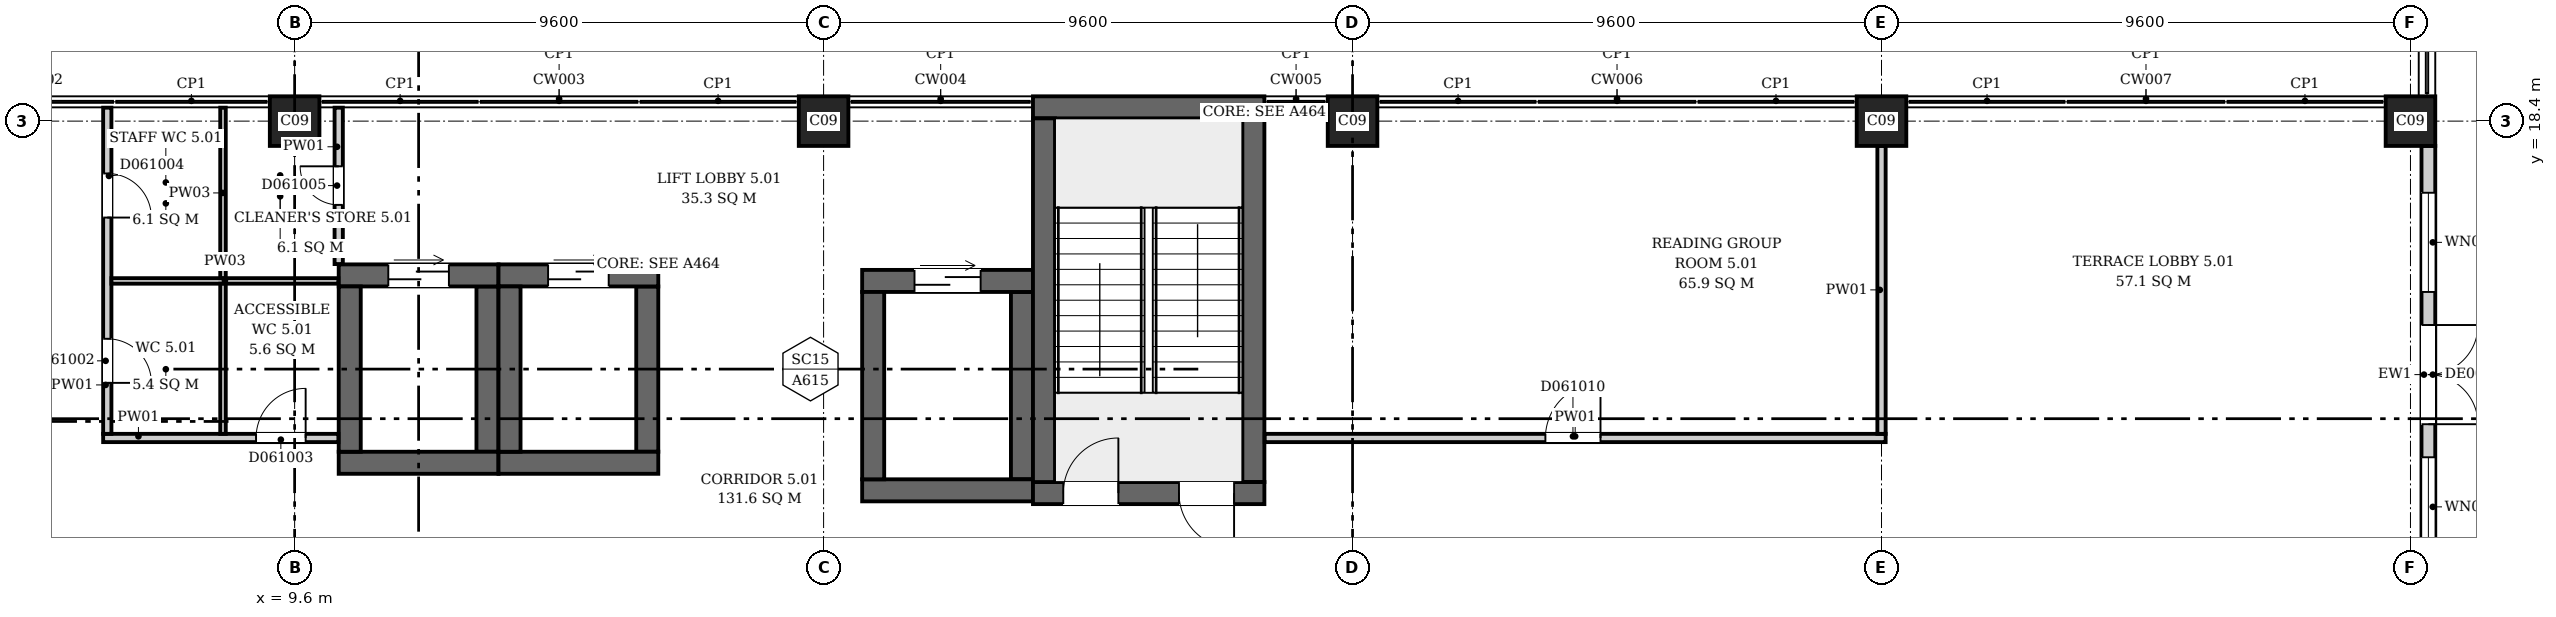
"""IFC4 building model, lengths in metres.
Left out: names, types, materials, properties, quantities, classifications, styles, units other than length and angle.
Written with IfcOpenShell. Run it as: python <this file> out.ifc"""

import sys

from ifc_helpers import new_model, si_unit, direction, frame, frame_2d, origin, origin_2d, place, context, subcontext, project, spatial, rectangle, extrude, element, fill, save


model = new_model("IFC4")
c1 = context("Model", 3, precision=1e-05, world=origin(), true_north=direction((0.0, 1.0)))
c2 = subcontext(c1, "Body", "Model", "MODEL_VIEW")
j1 = project(units=[si_unit("LENGTHUNIT", "METRE"), si_unit("PLANEANGLEUNIT", "RADIAN")], contexts=[c1])
p1 = place(None, origin())
s1 = spatial("IfcSite", under=j1, at=p1, CompositionType="ELEMENT")
p2 = place(p1, origin())
s2 = spatial("IfcBuilding", under=s1, at=p2, CompositionType="ELEMENT")
p3 = place(p2, frame((0.0, 0.0, 31.9)))
s3 = spatial("IfcBuildingStorey", under=s2, at=p3, CompositionType="ELEMENT", Elevation=31.9)
p4 = place(p3, frame((23.0, 11.65, 0.0), z_axis=(0.0, 0.0, 1.0), x_axis=(1.0, 0.0, 0.0)))
e1 = element("IfcWall", 1, at=p4, inside=s3, PredefinedType="SHEAR", context=c2, shape_type="SweptSolid", body=[
    extrude(rectangle(XDim=4.2, YDim=0.4, at=frame_2d((2.1, 0.0))), origin(), (0.0, 0.0, 1.0), 4.2),
])
p5 = place(p4, frame((0.55, 0.0, 0.0)))
e2 = element("IfcOpeningElement", 2, at=p5, cuts=e1, PredefinedType="OPENING", context=c2, shape_type="SweptSolid", body=[
    extrude(rectangle(XDim=1.0, YDim=2.1, at=frame_2d((0.5, 1.05))), frame((0.0, 0.21, 0.0), z_axis=(0.0, -1.0, 0.0), x_axis=(1.0, 0.0, 0.0)), (0.0, 0.0, 1.0), 0.42),
])
p6 = place(p4, frame((2.65, 0.0, 0.0)))
e3 = element("IfcOpeningElement", 3, at=p6, cuts=e1, PredefinedType="OPENING", context=c2, shape_type="SweptSolid", body=[
    extrude(rectangle(XDim=1.0, YDim=2.1, at=frame_2d((0.5, 1.05))), frame((0.0, 0.21, 0.0), z_axis=(0.0, -1.0, 0.0), x_axis=(1.0, 0.0, 0.0)), (0.0, 0.0, 1.0), 0.42),
])
p7 = place(p3, frame((23.0, 18.65, 0.0), z_axis=(0.0, 0.0, 1.0), x_axis=(1.0, 0.0, 0.0)))
e4 = element("IfcWall", 4, at=p7, inside=s3, PredefinedType="SHEAR", context=c2, shape_type="SweptSolid", body=[
    extrude(rectangle(XDim=4.2, YDim=0.4, at=frame_2d((2.1, 0.0))), origin(), (0.0, 0.0, 1.0), 4.2),
])
for number, where, z_axis, x_axis in (
    (5, (23.2, 11.85, 0.0), (0.0, 0.0, 1.0), (0.0, 1.0, 0.0)),
    (6, (27.0, 11.85, 0.0), (0.0, 0.0, 1.0), (0.0, 1.0, 0.0)),
):
    element("IfcWall", number, at=place(p3, frame(where, z_axis=z_axis, x_axis=x_axis)), inside=s3, PredefinedType="SHEAR", context=c2, shape_type="SweptSolid", body=[
        extrude(rectangle(XDim=6.6, YDim=0.4, at=frame_2d((3.3, 0.0))), origin(), (0.0, 0.0, 1.0), 4.2),
    ])
p8 = place(p3, frame((10.4, 12.2, 0.0), z_axis=(0.0, 0.0, 1.0), x_axis=(1.0, 0.0, 0.0)))
e7 = element("IfcWall", 7, at=p8, inside=s3, PredefinedType="SHEAR", context=c2, shape_type="SweptSolid", body=[
    extrude(rectangle(XDim=2.9, YDim=0.4, at=frame_2d((1.45, 0.0))), origin(), (0.0, 0.0, 1.0), 4.2),
])
p9 = place(p3, frame((10.4, 15.6, 0.0), z_axis=(0.0, 0.0, 1.0), x_axis=(1.0, 0.0, 0.0)))
e8 = element("IfcWall", 8, at=p9, inside=s3, PredefinedType="SHEAR", context=c2, shape_type="SweptSolid", body=[
    extrude(rectangle(XDim=2.9, YDim=0.4, at=frame_2d((1.45, 0.0))), origin(), (0.0, 0.0, 1.0), 4.2),
])
p10 = place(p9, frame((0.9, 0.0, 0.0)))
e9 = element("IfcOpeningElement", 9, at=p10, cuts=e8, PredefinedType="OPENING", context=c2, shape_type="SweptSolid", body=[
    extrude(rectangle(XDim=1.1, YDim=2.1, at=frame_2d((0.55, 1.05))), frame((0.0, 0.21, 0.0), z_axis=(0.0, -1.0, 0.0), x_axis=(1.0, 0.0, 0.0)), (0.0, 0.0, 1.0), 0.42),
])
for number, where, z_axis, x_axis in (
    (10, (10.6, 12.4, 0.0), (0.0, 0.0, 1.0), (0.0, 1.0, 0.0)),
    (11, (13.1, 12.4, 0.0), (0.0, 0.0, 1.0), (0.0, 1.0, 0.0)),
):
    element("IfcWall", number, at=place(p3, frame(where, z_axis=z_axis, x_axis=x_axis)), inside=s3, PredefinedType="SHEAR", context=c2, shape_type="SweptSolid", body=[
        extrude(rectangle(XDim=3.0, YDim=0.4, at=frame_2d((1.5, 0.0))), origin(), (0.0, 0.0, 1.0), 4.2),
    ])
p11 = place(p3, frame((13.3, 12.2, 0.0), z_axis=(0.0, 0.0, 1.0), x_axis=(1.0, 0.0, 0.0)))
e12 = element("IfcWall", 12, at=p11, inside=s3, PredefinedType="SHEAR", context=c2, shape_type="SweptSolid", body=[
    extrude(rectangle(XDim=2.9, YDim=0.4, at=frame_2d((1.45, 0.0))), origin(), (0.0, 0.0, 1.0), 4.2),
])
p12 = place(p3, frame((13.3, 15.6, 0.0), z_axis=(0.0, 0.0, 1.0), x_axis=(1.0, 0.0, 0.0)))
e13 = element("IfcWall", 13, at=p12, inside=s3, PredefinedType="SHEAR", context=c2, shape_type="SweptSolid", body=[
    extrude(rectangle(XDim=2.9, YDim=0.4, at=frame_2d((1.45, 0.0))), origin(), (0.0, 0.0, 1.0), 4.2),
])
p13 = place(p12, frame((0.9, 0.0, 0.0)))
e14 = element("IfcOpeningElement", 14, at=p13, cuts=e13, PredefinedType="OPENING", context=c2, shape_type="SweptSolid", body=[
    extrude(rectangle(XDim=1.1, YDim=2.1, at=frame_2d((0.55, 1.05))), frame((0.0, 0.21, 0.0), z_axis=(0.0, -1.0, 0.0), x_axis=(1.0, 0.0, 0.0)), (0.0, 0.0, 1.0), 0.42),
])
for number, where, z_axis, x_axis in (
    (15, (13.5, 12.4, 0.0), (0.0, 0.0, 1.0), (0.0, 1.0, 0.0)),
    (16, (16.0, 12.4, 0.0), (0.0, 0.0, 1.0), (0.0, 1.0, 0.0)),
):
    element("IfcWall", number, at=place(p3, frame(where, z_axis=z_axis, x_axis=x_axis)), inside=s3, PredefinedType="SHEAR", context=c2, shape_type="SweptSolid", body=[
        extrude(rectangle(XDim=3.0, YDim=0.4, at=frame_2d((1.5, 0.0))), origin(), (0.0, 0.0, 1.0), 4.2),
    ])
p14 = place(p3, frame((19.9, 11.7, 0.0), z_axis=(0.0, 0.0, 1.0), x_axis=(1.0, 0.0, 0.0)))
e17 = element("IfcWall", 17, at=p14, inside=s3, PredefinedType="SHEAR", context=c2, shape_type="SweptSolid", body=[
    extrude(rectangle(XDim=3.1, YDim=0.4, at=frame_2d((1.55, 0.0))), origin(), (0.0, 0.0, 1.0), 4.2),
])
p15 = place(p3, frame((19.9, 15.5, 0.0), z_axis=(0.0, 0.0, 1.0), x_axis=(1.0, 0.0, 0.0)))
e18 = element("IfcWall", 18, at=p15, inside=s3, PredefinedType="SHEAR", context=c2, shape_type="SweptSolid", body=[
    extrude(rectangle(XDim=3.1, YDim=0.4, at=frame_2d((1.55, 0.0))), origin(), (0.0, 0.0, 1.0), 4.2),
])
p16 = place(p15, frame((0.95, 0.0, 0.0)))
e19 = element("IfcOpeningElement", 19, at=p16, cuts=e18, PredefinedType="OPENING", context=c2, shape_type="SweptSolid", body=[
    extrude(rectangle(XDim=1.2, YDim=2.1, at=frame_2d((0.6, 1.05))), frame((0.0, 0.21, 0.0), z_axis=(0.0, -1.0, 0.0), x_axis=(1.0, 0.0, 0.0)), (0.0, 0.0, 1.0), 0.42),
])
for number, where, z_axis, x_axis in (
    (20, (20.1, 11.9, 0.0), (0.0, 0.0, 1.0), (0.0, 1.0, 0.0)),
    (21, (22.8, 11.9, 0.0), (0.0, 0.0, 1.0), (0.0, 1.0, 0.0)),
):
    element("IfcWall", number, at=place(p3, frame(where, z_axis=z_axis, x_axis=x_axis)), inside=s3, PredefinedType="SHEAR", context=c2, shape_type="SweptSolid", body=[
        extrude(rectangle(XDim=3.4, YDim=0.4, at=frame_2d((1.7, 0.0))), origin(), (0.0, 0.0, 1.0), 4.2),
    ])
for number, where, z_axis, x_axis in (
    (22, (9.6, 18.4, 0.0), (0.0, 0.0, 1.0), (1.0, 0.0, 0.0)),
    (23, (19.2, 18.4, 0.0), (0.0, 0.0, 1.0), (1.0, 0.0, 0.0)),
    (24, (28.8, 18.4, 0.0), (0.0, 0.0, 1.0), (1.0, 0.0, 0.0)),
    (25, (38.4, 18.4, 0.0), (0.0, 0.0, 1.0), (1.0, 0.0, 0.0)),
    (26, (48.0, 18.4, 0.0), (0.0, 0.0, 1.0), (1.0, 0.0, 0.0)),
):
    element("IfcColumn", number, at=place(p3, frame(where, z_axis=z_axis, x_axis=x_axis)), inside=s3, PredefinedType="COLUMN", context=c2, shape_type="SweptSolid", body=[
        extrude(rectangle(XDim=0.9, YDim=0.9, at=origin_2d()), origin(), (0.0, 0.0, 1.0), 4.2),
    ])
p17 = place(p3, frame((48.325, 9.65, 0.0), z_axis=(0.0, 0.0, 1.0), x_axis=(0.0, 1.0, 0.0)))
e27 = element("IfcWall", 27, at=p17, inside=s3, PredefinedType="ELEMENTEDWALL", context=c2, shape_type="SweptSolid", body=[
    extrude(rectangle(XDim=8.3, YDim=0.25, at=frame_2d((4.15, 0.0))), origin(), (0.0, 0.0, 1.0), 3.9),
])
p18 = place(p17, frame((3.25, 0.0, 0.0)))
e28 = element("IfcOpeningElement", 28, at=p18, cuts=e27, PredefinedType="OPENING", context=c2, shape_type="SweptSolid", body=[
    extrude(rectangle(XDim=1.8, YDim=2.4, at=frame_2d((0.9, 1.2))), frame((0.0, 0.135, 0.0), z_axis=(0.0, -1.0, 0.0), x_axis=(1.0, 0.0, 0.0)), (0.0, 0.0, 1.0), 0.27),
])
p19 = place(p17, frame((0.85, 0.0, 0.9)))
e29 = element("IfcOpeningElement", 29, at=p19, cuts=e27, PredefinedType="OPENING", context=c2, shape_type="SweptSolid", body=[
    extrude(rectangle(XDim=1.8, YDim=2.6, at=frame_2d((0.9, 1.3))), frame((0.0, 0.135, 0.0), z_axis=(0.0, -1.0, 0.0), x_axis=(1.0, 0.0, 0.0)), (0.0, 0.0, 1.0), 0.27),
])
p20 = place(p17, frame((5.65, 0.0, 0.9)))
e30 = element("IfcOpeningElement", 30, at=p20, cuts=e27, PredefinedType="OPENING", context=c2, shape_type="SweptSolid", body=[
    extrude(rectangle(XDim=1.8, YDim=2.6, at=frame_2d((0.9, 1.3))), frame((0.0, 0.135, 0.0), z_axis=(0.0, -1.0, 0.0), x_axis=(1.0, 0.0, 0.0)), (0.0, 0.0, 1.0), 0.27),
])
p21 = place(p3, frame((6.125, 12.65, 0.0), z_axis=(0.0, 0.0, 1.0), x_axis=(1.0, 0.0, 0.0)))
e31 = element("IfcWall", 31, at=p21, inside=s3, PredefinedType="PARTITIONING", context=c2, shape_type="SweptSolid", body=[
    extrude(rectangle(XDim=4.269, YDim=0.15, at=frame_2d((2.135, 0.0))), origin(), (0.0, 0.0, 1.0), 3.9),
])
p22 = place(p21, frame((2.775, 0.0, 0.0)))
e32 = element("IfcOpeningElement", 32, at=p22, cuts=e31, PredefinedType="OPENING", context=c2, shape_type="SweptSolid", body=[
    extrude(rectangle(XDim=0.9, YDim=2.1, at=frame_2d((0.45, 1.05))), frame((0.0, 0.085, 0.0), z_axis=(0.0, -1.0, 0.0), x_axis=(1.0, 0.0, 0.0)), (0.0, 0.0, 1.0), 0.17),
])
p23 = place(p3, frame((6.2, 12.725, 0.0), z_axis=(0.0, 0.0, 1.0), x_axis=(0.0, 1.0, 0.0)))
e33 = element("IfcWall", 33, at=p23, inside=s3, PredefinedType="PARTITIONING", context=c2, shape_type="SweptSolid", body=[
    extrude(rectangle(XDim=5.919, YDim=0.15, at=frame_2d((2.959, 0.0))), origin(), (0.0, 0.0, 1.0), 3.9),
])
p24 = place(p23, frame((0.925, 0.0, 0.0)))
e34 = element("IfcOpeningElement", 34, at=p24, cuts=e33, PredefinedType="OPENING", context=c2, shape_type="SweptSolid", body=[
    extrude(rectangle(XDim=0.8, YDim=2.1, at=frame_2d((0.4, 1.05))), frame((0.0, 0.085, 0.0), z_axis=(0.0, -1.0, 0.0), x_axis=(1.0, 0.0, 0.0)), (0.0, 0.0, 1.0), 0.17),
])
p25 = place(p23, frame((3.925, 0.0, 0.0)))
e35 = element("IfcOpeningElement", 35, at=p25, cuts=e33, PredefinedType="OPENING", context=c2, shape_type="SweptSolid", body=[
    extrude(rectangle(XDim=0.8, YDim=2.1, at=frame_2d((0.4, 1.05))), frame((0.0, 0.085, 0.0), z_axis=(0.0, -1.0, 0.0), x_axis=(1.0, 0.0, 0.0)), (0.0, 0.0, 1.0), 0.17),
])
p26 = place(p3, frame((6.275, 15.5, 0.0), z_axis=(0.0, 0.0, 1.0), x_axis=(1.0, 0.0, 0.0)))
e36 = element("IfcWall", 36, at=p26, inside=s3, PredefinedType="PARTITIONING", context=c2, shape_type="SweptSolid", body=[
    extrude(rectangle(XDim=4.119, YDim=0.1, at=frame_2d((2.06, 0.0))), origin(), (0.0, 0.0, 1.0), 3.9),
])
p27 = place(p3, frame((8.3, 12.725, 0.0), z_axis=(0.0, 0.0, 1.0), x_axis=(0.0, 1.0, 0.0)))
e37 = element("IfcWall", 37, at=p27, inside=s3, PredefinedType="PARTITIONING", context=c2, shape_type="SweptSolid", body=[
    extrude(rectangle(XDim=2.725, YDim=0.1, at=frame_2d((1.362, 0.0))), origin(), (0.0, 0.0, 1.0), 3.9),
])
p28 = place(p3, frame((8.3, 15.55, 0.0), z_axis=(0.0, 0.0, 1.0), x_axis=(0.0, 1.0, 0.0)))
e38 = element("IfcWall", 38, at=p28, inside=s3, PredefinedType="PARTITIONING", context=c2, shape_type="SweptSolid", body=[
    extrude(rectangle(XDim=3.094, YDim=0.1, at=frame_2d((1.547, 0.0))), origin(), (0.0, 0.0, 1.0), 3.9),
])
p29 = place(p3, frame((10.4, 15.806, 0.0), z_axis=(0.0, 0.0, 1.0), x_axis=(0.0, 1.0, 0.0)))
e39 = element("IfcWall", 39, at=p29, inside=s3, PredefinedType="PARTITIONING", context=c2, shape_type="SweptSolid", body=[
    extrude(rectangle(XDim=2.838, YDim=0.15, at=frame_2d((1.419, 0.0))), origin(), (0.0, 0.0, 1.0), 3.9),
])
p30 = place(p29, frame((1.074, 0.0, 0.0)))
e40 = element("IfcOpeningElement", 40, at=p30, cuts=e39, PredefinedType="OPENING", context=c2, shape_type="SweptSolid", body=[
    extrude(rectangle(XDim=0.7, YDim=2.1, at=frame_2d((0.35, 1.05))), frame((0.0, 0.085, 0.0), z_axis=(0.0, -1.0, 0.0), x_axis=(1.0, 0.0, 0.0)), (0.0, 0.0, 1.0), 0.17),
])
p31 = place(p3, frame((27.206, 12.65, 0.0), z_axis=(0.0, 0.0, 1.0), x_axis=(1.0, 0.0, 0.0)))
e41 = element("IfcWall", 41, at=p31, inside=s3, PredefinedType="PARTITIONING", context=c2, shape_type="SweptSolid", body=[
    extrude(rectangle(XDim=11.269, YDim=0.15, at=frame_2d((5.635, 0.0))), origin(), (0.0, 0.0, 1.0), 3.9),
])
p32 = place(p31, frame((5.094, 0.0, 0.0)))
e42 = element("IfcOpeningElement", 42, at=p32, cuts=e41, PredefinedType="OPENING", context=c2, shape_type="SweptSolid", body=[
    extrude(rectangle(XDim=1.0, YDim=2.1, at=frame_2d((0.5, 1.05))), frame((0.0, 0.085, 0.0), z_axis=(0.0, -1.0, 0.0), x_axis=(1.0, 0.0, 0.0)), (0.0, 0.0, 1.0), 0.17),
])
p33 = place(p3, frame((38.4, 12.725, 0.0), z_axis=(0.0, 0.0, 1.0), x_axis=(0.0, 1.0, 0.0)))
e43 = element("IfcWall", 43, at=p33, inside=s3, PredefinedType="PARTITIONING", context=c2, shape_type="SweptSolid", body=[
    extrude(rectangle(XDim=5.225, YDim=0.15, at=frame_2d((2.612, 0.0))), origin(), (0.0, 0.0, 1.0), 3.9),
])
p34 = place(p18, frame((1.8, 0.0, 0.0), z_axis=(0.0, 0.0, 1.0), x_axis=(-1.0, 0.0, 0.0)))
e44 = element("IfcDoor", 44, at=p34, inside=s3, OperationType="DOUBLE_DOOR_SINGLE_SWING", PredefinedType="DOOR", context=c2, shape_type="SweptSolid", body=[
    extrude(rectangle(XDim=1.8, YDim=2.4, at=frame_2d((0.9, 1.2))), frame((0.0, 0.025, 0.0), z_axis=(0.0, -1.0, 0.0), x_axis=(1.0, 0.0, 0.0)), (0.0, 0.0, 1.0), 0.05),
])
fill(e28, e44)
p35 = place(p19, origin())
e45 = element("IfcWindow", 45, at=p35, inside=s3, PartitioningType="SINGLE_PANEL", PredefinedType="WINDOW", context=c2, shape_type="SweptSolid", body=[
    extrude(rectangle(XDim=1.8, YDim=2.6, at=frame_2d((0.9, 1.3))), frame((0.0, 0.03, 0.0), z_axis=(0.0, -1.0, 0.0), x_axis=(1.0, 0.0, 0.0)), (0.0, 0.0, 1.0), 0.06),
])
fill(e29, e45)
p36 = place(p20, origin())
e46 = element("IfcWindow", 46, at=p36, inside=s3, PartitioningType="SINGLE_PANEL", PredefinedType="WINDOW", context=c2, shape_type="SweptSolid", body=[
    extrude(rectangle(XDim=1.8, YDim=2.6, at=frame_2d((0.9, 1.3))), frame((0.0, 0.03, 0.0), z_axis=(0.0, -1.0, 0.0), x_axis=(1.0, 0.0, 0.0)), (0.0, 0.0, 1.0), 0.06),
])
fill(e30, e46)
p37 = place(p5, origin())
e47 = element("IfcDoor", 47, at=p37, inside=s3, OperationType="SINGLE_SWING_RIGHT", PredefinedType="DOOR", context=c2, shape_type="SweptSolid", body=[
    extrude(rectangle(XDim=1.0, YDim=2.1, at=frame_2d((0.5, 1.05))), frame((0.0, 0.025, 0.0), z_axis=(0.0, -1.0, 0.0), x_axis=(1.0, 0.0, 0.0)), (0.0, 0.0, 1.0), 0.05),
])
fill(e2, e47)
p38 = place(p6, origin())
e48 = element("IfcDoor", 48, at=p38, inside=s3, OperationType="SINGLE_SWING_LEFT", PredefinedType="DOOR", context=c2, shape_type="SweptSolid", body=[
    extrude(rectangle(XDim=1.0, YDim=2.1, at=frame_2d((0.5, 1.05))), frame((0.0, 0.025, 0.0), z_axis=(0.0, -1.0, 0.0), x_axis=(1.0, 0.0, 0.0)), (0.0, 0.0, 1.0), 0.05),
])
fill(e3, e48)
p39 = place(p10, origin())
e49 = element("IfcDoor", 49, at=p39, inside=s3, OperationType="DOUBLE_DOOR_SLIDING", PredefinedType="DOOR", context=c2, shape_type="SweptSolid", body=[
    extrude(rectangle(XDim=1.1, YDim=2.1, at=frame_2d((0.55, 1.05))), frame((0.0, 0.025, 0.0), z_axis=(0.0, -1.0, 0.0), x_axis=(1.0, 0.0, 0.0)), (0.0, 0.0, 1.0), 0.05),
])
fill(e9, e49)
p40 = place(p13, origin())
e50 = element("IfcDoor", 50, at=p40, inside=s3, OperationType="DOUBLE_DOOR_SLIDING", PredefinedType="DOOR", context=c2, shape_type="SweptSolid", body=[
    extrude(rectangle(XDim=1.1, YDim=2.1, at=frame_2d((0.55, 1.05))), frame((0.0, 0.025, 0.0), z_axis=(0.0, -1.0, 0.0), x_axis=(1.0, 0.0, 0.0)), (0.0, 0.0, 1.0), 0.05),
])
fill(e14, e50)
p41 = place(p16, origin())
e51 = element("IfcDoor", 51, at=p41, inside=s3, OperationType="DOUBLE_DOOR_SLIDING", PredefinedType="DOOR", context=c2, shape_type="SweptSolid", body=[
    extrude(rectangle(XDim=1.2, YDim=2.1, at=frame_2d((0.6, 1.05))), frame((0.0, 0.025, 0.0), z_axis=(0.0, -1.0, 0.0), x_axis=(1.0, 0.0, 0.0)), (0.0, 0.0, 1.0), 0.05),
])
fill(e19, e51)
p42 = place(p24, origin())
e52 = element("IfcDoor", 52, at=p42, inside=s3, OperationType="SINGLE_SWING_LEFT", PredefinedType="DOOR", context=c2, shape_type="SweptSolid", body=[
    extrude(rectangle(XDim=0.8, YDim=2.1, at=frame_2d((0.4, 1.05))), frame((0.0, 0.025, 0.0), z_axis=(0.0, -1.0, 0.0), x_axis=(1.0, 0.0, 0.0)), (0.0, 0.0, 1.0), 0.05),
])
fill(e34, e52)
p43 = place(p22, origin())
e53 = element("IfcDoor", 53, at=p43, inside=s3, OperationType="SINGLE_SWING_RIGHT", PredefinedType="DOOR", context=c2, shape_type="SweptSolid", body=[
    extrude(rectangle(XDim=0.9, YDim=2.1, at=frame_2d((0.45, 1.05))), frame((0.0, 0.025, 0.0), z_axis=(0.0, -1.0, 0.0), x_axis=(1.0, 0.0, 0.0)), (0.0, 0.0, 1.0), 0.05),
])
fill(e32, e53)
p44 = place(p25, origin())
e54 = element("IfcDoor", 54, at=p44, inside=s3, OperationType="SINGLE_SWING_LEFT", PredefinedType="DOOR", context=c2, shape_type="SweptSolid", body=[
    extrude(rectangle(XDim=0.8, YDim=2.1, at=frame_2d((0.4, 1.05))), frame((0.0, 0.025, 0.0), z_axis=(0.0, -1.0, 0.0), x_axis=(1.0, 0.0, 0.0)), (0.0, 0.0, 1.0), 0.05),
])
fill(e35, e54)
p45 = place(p30, origin())
e55 = element("IfcDoor", 55, at=p45, inside=s3, OperationType="SINGLE_SWING_LEFT", PredefinedType="DOOR", context=c2, shape_type="SweptSolid", body=[
    extrude(rectangle(XDim=0.7, YDim=2.1, at=frame_2d((0.35, 1.05))), frame((0.0, 0.025, 0.0), z_axis=(0.0, -1.0, 0.0), x_axis=(1.0, 0.0, 0.0)), (0.0, 0.0, 1.0), 0.05),
])
fill(e40, e55)
p46 = place(p32, origin())
e56 = element("IfcDoor", 56, at=p46, inside=s3, OperationType="SINGLE_SWING_LEFT", PredefinedType="DOOR", context=c2, shape_type="SweptSolid", body=[
    extrude(rectangle(XDim=1.0, YDim=2.1, at=frame_2d((0.5, 1.05))), frame((0.0, 0.025, 0.0), z_axis=(0.0, -1.0, 0.0), x_axis=(1.0, 0.0, 0.0)), (0.0, 0.0, 1.0), 0.05),
])
fill(e42, e56)
save(model, sys.argv[1])
